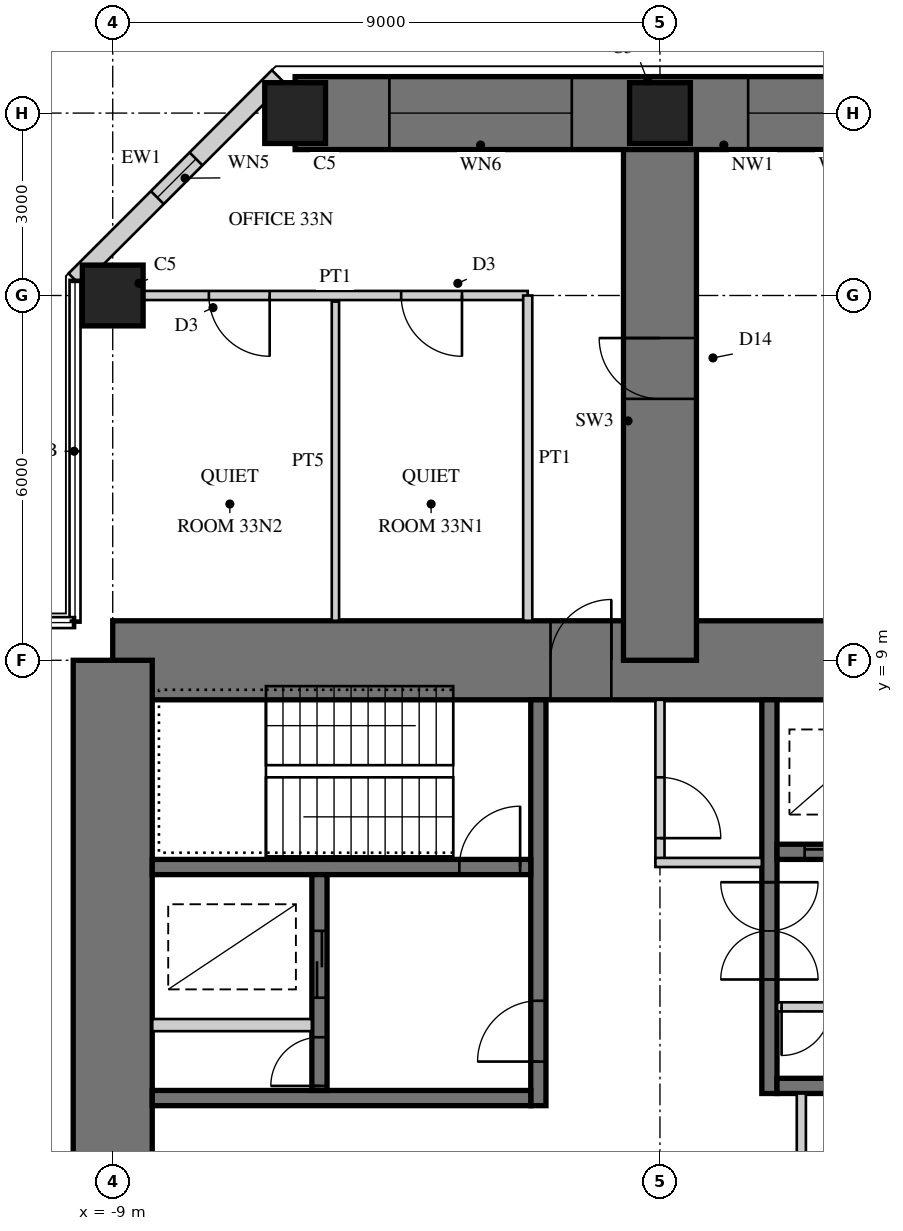
"""IFC4 building model, lengths in metres.
Left out: names, types, materials, properties, quantities, classifications, styles, units other than length and angle.
Written with IfcOpenShell. Run it as: python <this file> out.ifc"""

import sys

from ifc_helpers import new_model, si_unit, direction, frame, frame_2d, origin, origin_2d, place, context, subcontext, project, spatial, rectangle, hollow_rectangle, extrude, element, fill, save


model = new_model("IFC4")
c1 = context("Model", 3, precision=1e-05, world=origin(), true_north=direction((0.0, 1.0)))
c2 = subcontext(c1, "Body", "Model", "MODEL_VIEW")
j1 = project(units=[si_unit("LENGTHUNIT", "METRE"), si_unit("PLANEANGLEUNIT", "RADIAN")], contexts=[c1])
p1 = place(None, origin())
s1 = spatial("IfcSite", under=j1, at=p1, CompositionType="ELEMENT")
p2 = place(p1, origin())
s2 = spatial("IfcBuilding", under=s1, at=p2, CompositionType="ELEMENT")
p3 = place(p2, frame((0.0, 0.0, 136.5)))
s3 = spatial("IfcBuildingStorey", under=s2, at=p3, CompositionType="ELEMENT", Elevation=136.5)
p4 = place(p3, frame((9.0, 9.0, 0.0), z_axis=(0.0, 0.0, 1.0), x_axis=(-1.0, 0.0, 0.0)))
e1 = element("IfcWall", 1, at=p4, inside=s3, PredefinedType="SHEAR", context=c2, shape_type="SweptSolid", body=[
    extrude(rectangle(XDim=18.0, YDim=1.3, at=frame_2d((9.0, 0.0))), origin(), (0.0, 0.0, 1.0), 4.0),
])
p5 = place(p4, frame((9.8, 0.0, 0.0)))
e2 = element("IfcOpeningElement", 2, at=p5, cuts=e1, PredefinedType="OPENING", context=c2, shape_type="SweptSolid", body=[
    extrude(rectangle(XDim=1.0, YDim=2.4, at=frame_2d((0.5, 1.2))), frame((0.0, 0.66, 0.0), z_axis=(0.0, -1.0, 0.0), x_axis=(1.0, 0.0, 0.0)), (0.0, 0.0, 1.0), 1.32),
])
p6 = place(p3, frame((-9.0, 9.0, 0.0), z_axis=(0.0, 0.0, 1.0), x_axis=(0.0, -1.0, 0.0)))
e3 = element("IfcWall", 3, at=p6, inside=s3, PredefinedType="SHEAR", context=c2, shape_type="SweptSolid", body=[
    extrude(rectangle(XDim=18.0, YDim=1.3, at=frame_2d((9.0, 0.0))), origin(), (0.0, 0.0, 1.0), 4.0),
])
p7 = place(p6, frame((9.8, 0.0, 0.0)))
e4 = element("IfcOpeningElement", 4, at=p7, cuts=e3, PredefinedType="OPENING", context=c2, shape_type="SweptSolid", body=[
    extrude(rectangle(XDim=1.0, YDim=2.4, at=frame_2d((0.5, 1.2))), frame((0.0, 0.66, 0.0), z_axis=(0.0, -1.0, 0.0), x_axis=(1.0, 0.0, 0.0)), (0.0, 0.0, 1.0), 1.32),
])
p8 = place(p3, frame((1.8, 1.875, 0.0), z_axis=(0.0, 0.0, 1.0), x_axis=(0.0, 1.0, 0.0)))
e5 = element("IfcWall", 5, at=p8, inside=s3, PredefinedType="SHEAR", context=c2, shape_type="SweptSolid", body=[
    extrude(rectangle(XDim=6.475, YDim=0.25, at=frame_2d((3.238, 0.0))), origin(), (0.0, 0.0, 1.0), 4.0),
])
p9 = place(p8, frame((1.875, 0.0, 0.0)))
e6 = element("IfcOpeningElement", 6, at=p9, cuts=e5, PredefinedType="OPENING", context=c2, shape_type="SweptSolid", body=[
    extrude(rectangle(XDim=1.6, YDim=2.4, at=frame_2d((0.8, 1.2))), frame((0.0, 0.135, 0.0), z_axis=(0.0, -1.0, 0.0), x_axis=(1.0, 0.0, 0.0)), (0.0, 0.0, 1.0), 0.27),
])
p10 = place(p3, frame((1.925, 2.0, 0.0), z_axis=(0.0, 0.0, 1.0), x_axis=(1.0, 0.0, 0.0)))
e7 = element("IfcWall", 7, at=p10, inside=s3, PredefinedType="SHEAR", context=c2, shape_type="SweptSolid", body=[
    extrude(rectangle(XDim=6.425, YDim=0.25, at=frame_2d((3.212, 0.0))), origin(), (0.0, 0.0, 1.0), 4.0),
])
p11 = place(p3, frame((1.925, 5.85, 0.0), z_axis=(0.0, 0.0, 1.0), x_axis=(1.0, 0.0, 0.0)))
e8 = element("IfcWall", 8, at=p11, inside=s3, PredefinedType="SHEAR", context=c2, shape_type="SweptSolid", body=[
    extrude(rectangle(XDim=6.425, YDim=0.25, at=frame_2d((3.212, 0.0))), origin(), (0.0, 0.0, 1.0), 4.0),
])
p12 = place(p11, frame((0.454, 0.0, 0.0)))
e9 = element("IfcOpeningElement", 9, at=p12, cuts=e8, PredefinedType="OPENING", context=c2, shape_type="SweptSolid", body=[
    extrude(rectangle(XDim=1.1, YDim=2.2, at=frame_2d((0.55, 1.1))), frame((0.0, 0.135, 0.0), z_axis=(0.0, -1.0, 0.0), x_axis=(1.0, 0.0, 0.0)), (0.0, 0.0, 1.0), 0.27),
])
p13 = place(p11, frame((2.663, 0.0, 0.0)))
e10 = element("IfcOpeningElement", 10, at=p13, cuts=e8, PredefinedType="OPENING", context=c2, shape_type="SweptSolid", body=[
    extrude(rectangle(XDim=1.1, YDim=2.2, at=frame_2d((0.55, 1.1))), frame((0.0, 0.135, 0.0), z_axis=(0.0, -1.0, 0.0), x_axis=(1.0, 0.0, 0.0)), (0.0, 0.0, 1.0), 0.27),
])
p14 = place(p11, frame((4.871, 0.0, 0.0)))
e11 = element("IfcOpeningElement", 11, at=p14, cuts=e8, PredefinedType="OPENING", context=c2, shape_type="SweptSolid", body=[
    extrude(rectangle(XDim=1.1, YDim=2.2, at=frame_2d((0.55, 1.1))), frame((0.0, 0.135, 0.0), z_axis=(0.0, -1.0, 0.0), x_axis=(1.0, 0.0, 0.0)), (0.0, 0.0, 1.0), 0.27),
])
p15 = place(p3, frame((1.925, 3.3, 0.0), z_axis=(0.0, 0.0, 1.0), x_axis=(1.0, 0.0, 0.0)))
e12 = element("IfcWall", 12, at=p15, inside=s3, PredefinedType="PARTITIONING", context=c2, shape_type="SweptSolid", body=[
    extrude(rectangle(XDim=6.425, YDim=0.15, at=frame_2d((3.212, 0.0))), origin(), (0.0, 0.0, 1.0), 4.0),
])
p16 = place(p15, frame((0.075, 0.0, 0.0)))
e13 = element("IfcOpeningElement", 13, at=p16, cuts=e12, PredefinedType="OPENING", context=c2, shape_type="SweptSolid", body=[
    extrude(rectangle(XDim=0.8, YDim=2.1, at=frame_2d((0.4, 1.05))), frame((0.0, 0.085, 0.0), z_axis=(0.0, -1.0, 0.0), x_axis=(1.0, 0.0, 0.0)), (0.0, 0.0, 1.0), 0.17),
])
p17 = place(p15, frame((3.675, 0.0, 0.0)))
e14 = element("IfcOpeningElement", 14, at=p17, cuts=e12, PredefinedType="OPENING", context=c2, shape_type="SweptSolid", body=[
    extrude(rectangle(XDim=0.8, YDim=2.1, at=frame_2d((0.4, 1.05))), frame((0.0, 0.085, 0.0), z_axis=(0.0, -1.0, 0.0), x_axis=(1.0, 0.0, 0.0)), (0.0, 0.0, 1.0), 0.17),
])
p18 = place(p3, frame((-2.0, 1.675, 0.0), z_axis=(0.0, 0.0, 1.0), x_axis=(0.0, 1.0, 0.0)))
e15 = element("IfcWall", 15, at=p18, inside=s3, PredefinedType="SHEAR", context=c2, shape_type="SweptSolid", body=[
    extrude(rectangle(XDim=6.675, YDim=0.25, at=frame_2d((3.337, 0.0))), origin(), (0.0, 0.0, 1.0), 4.0),
])
p19 = place(p18, frame((0.725, 0.0, 0.0)))
e16 = element("IfcOpeningElement", 16, at=p19, cuts=e15, PredefinedType="OPENING", context=c2, shape_type="SweptSolid", body=[
    extrude(rectangle(XDim=1.0, YDim=2.1, at=frame_2d((0.5, 1.05))), frame((0.0, 0.135, 0.0), z_axis=(0.0, -1.0, 0.0), x_axis=(1.0, 0.0, 0.0)), (0.0, 0.0, 1.0), 0.27),
])
p20 = place(p3, frame((-2.125, 1.8, 0.0), z_axis=(0.0, 0.0, 1.0), x_axis=(-1.0, 0.0, 0.0)))
e17 = element("IfcWall", 17, at=p20, inside=s3, PredefinedType="SHEAR", context=c2, shape_type="SweptSolid", body=[
    extrude(rectangle(XDim=6.225, YDim=0.25, at=frame_2d((3.113, 0.0))), origin(), (0.0, 0.0, 1.0), 4.0),
])
p21 = place(p3, frame((-2.125, 5.6, 0.0), z_axis=(0.0, 0.0, 1.0), x_axis=(-1.0, 0.0, 0.0)))
e18 = element("IfcWall", 18, at=p21, inside=s3, PredefinedType="SHEAR", context=c2, shape_type="SweptSolid", body=[
    extrude(rectangle(XDim=6.225, YDim=0.25, at=frame_2d((3.113, 0.0))), origin(), (0.0, 0.0, 1.0), 4.0),
])
p22 = place(p21, frame((0.175, 0.0, 0.0)))
e19 = element("IfcOpeningElement", 19, at=p22, cuts=e18, PredefinedType="OPENING", context=c2, shape_type="SweptSolid", body=[
    extrude(rectangle(XDim=1.0, YDim=2.1, at=frame_2d((0.5, 1.05))), frame((0.0, 0.135, 0.0), z_axis=(0.0, -1.0, 0.0), x_axis=(1.0, 0.0, 0.0)), (0.0, 0.0, 1.0), 0.27),
])
p23 = place(p3, frame((-5.6, 1.925, 0.0), z_axis=(0.0, 0.0, 1.0), x_axis=(0.0, 1.0, 0.0)))
e20 = element("IfcWall", 20, at=p23, inside=s3, PredefinedType="SHEAR", context=c2, shape_type="SweptSolid", body=[
    extrude(rectangle(XDim=3.55, YDim=0.25, at=frame_2d((1.775, 0.0))), origin(), (0.0, 0.0, 1.0), 4.0),
])
p24 = place(p23, frame((1.525, 0.0, 0.0)))
e21 = element("IfcOpeningElement", 21, at=p24, cuts=e20, PredefinedType="OPENING", context=c2, shape_type="SweptSolid", body=[
    extrude(rectangle(XDim=1.1, YDim=2.2, at=frame_2d((0.55, 1.1))), frame((0.0, 0.135, 0.0), z_axis=(0.0, -1.0, 0.0), x_axis=(1.0, 0.0, 0.0)), (0.0, 0.0, 1.0), 0.27),
])
p25 = place(p23, frame((0.075, 0.0, 0.0)))
e22 = element("IfcOpeningElement", 22, at=p25, cuts=e20, PredefinedType="OPENING", context=c2, shape_type="SweptSolid", body=[
    extrude(rectangle(XDim=0.8, YDim=2.1, at=frame_2d((0.4, 1.05))), frame((0.0, 0.135, 0.0), z_axis=(0.0, -1.0, 0.0), x_axis=(1.0, 0.0, 0.0)), (0.0, 0.0, 1.0), 0.27),
])
p26 = place(p3, frame((-5.725, 3.0, 0.0), z_axis=(0.0, 0.0, 1.0), x_axis=(-1.0, 0.0, 0.0)))
e23 = element("IfcWall", 23, at=p26, inside=s3, PredefinedType="PARTITIONING", context=c2, shape_type="SweptSolid", body=[
    extrude(rectangle(XDim=2.625, YDim=0.2, at=frame_2d((1.312, 0.0))), origin(), (0.0, 0.0, 1.0), 4.0),
])
p27 = place(p3, frame((0.0, 9.0, 0.0), z_axis=(0.0, 0.0, 1.0), x_axis=(0.0, 1.0, 0.0)))
e24 = element("IfcWall", 24, at=p27, inside=s3, PredefinedType="SHEAR", context=c2, shape_type="SweptSolid", body=[
    extrude(rectangle(XDim=9.0, YDim=1.2, at=frame_2d((4.5, 0.0))), origin(), (0.0, 0.0, 1.0), 4.0),
])
p28 = place(p27, frame((4.3, 0.0, 0.0)))
e25 = element("IfcOpeningElement", 25, at=p28, cuts=e24, PredefinedType="OPENING", context=c2, shape_type="SweptSolid", body=[
    extrude(rectangle(XDim=1.0, YDim=2.2, at=frame_2d((0.5, 1.1))), frame((0.0, 0.61, 0.0), z_axis=(0.0, -1.0, 0.0), x_axis=(1.0, 0.0, 0.0)), (0.0, 0.0, 1.0), 1.22),
])
p29 = place(p3, frame((6.0, 18.0, 0.0), z_axis=(0.0, 0.0, 1.0), x_axis=(-1.0, 0.0, 0.0)))
e26 = element("IfcWall", 26, at=p29, inside=s3, PredefinedType="SHEAR", context=c2, shape_type="SweptSolid", body=[
    extrude(rectangle(XDim=12.0, YDim=1.2, at=frame_2d((6.0, 0.0))), origin(), (0.0, 0.0, 1.0), 4.0),
])
p30 = place(p29, frame((1.55, 0.0, 0.6)))
e27 = element("IfcOpeningElement", 27, at=p30, cuts=e26, PredefinedType="OPENING", context=c2, shape_type="SweptSolid", body=[
    extrude(rectangle(XDim=3.0, YDim=2.4, at=frame_2d((1.5, 1.2))), frame((0.0, 0.61, 0.0), z_axis=(0.0, -1.0, 0.0), x_axis=(1.0, 0.0, 0.0)), (0.0, 0.0, 1.0), 1.22),
])
p31 = place(p29, frame((7.45, 0.0, 0.6)))
e28 = element("IfcOpeningElement", 28, at=p31, cuts=e26, PredefinedType="OPENING", context=c2, shape_type="SweptSolid", body=[
    extrude(rectangle(XDim=3.0, YDim=2.4, at=frame_2d((1.5, 1.2))), frame((0.0, 0.61, 0.0), z_axis=(0.0, -1.0, 0.0), x_axis=(1.0, 0.0, 0.0)), (0.0, 0.0, 1.0), 1.22),
])
for number, where, z_axis, x_axis in (
    (29, (-9.0, 15.0, 0.0), (0.0, 0.0, 1.0), (1.0, 0.0, 0.0)),
    (30, (0.0, 18.0, 0.0), (0.0, 0.0, 1.0), (1.0, 0.0, 0.0)),
    (31, (-6.0, 18.0, 0.0), (0.0, 0.0, 1.0), (1.0, 0.0, 0.0)),
):
    element("IfcColumn", number, at=place(p3, frame(where, z_axis=z_axis, x_axis=x_axis)), inside=s3, PredefinedType="COLUMN", context=c2, shape_type="SweptSolid", body=[
        extrude(rectangle(XDim=1.0, YDim=1.0, at=origin_2d()), origin(), (0.0, 0.0, 1.0), 4.0),
    ])
p32 = place(p3, frame((-6.277, 18.6, 0.0), z_axis=(0.0, 0.0, 1.0), x_axis=(-0.707106781187, -0.707106781187, 0.0)))
e32 = element("IfcWall", 32, at=p32, inside=s3, PredefinedType="SOLIDWALL", context=c2, shape_type="SweptSolid", body=[
    extrude(rectangle(XDim=4.728, YDim=0.3, at=frame_2d((2.364, 0.0))), origin(), (0.0, 0.0, 1.0), 3.8),
])
p33 = place(p32, frame((1.914, 0.0, 0.3)))
e33 = element("IfcOpeningElement", 33, at=p33, cuts=e32, PredefinedType="OPENING", context=c2, shape_type="SweptSolid", body=[
    extrude(rectangle(XDim=0.9, YDim=2.4, at=frame_2d((0.45, 1.2))), frame((0.0, 0.16, 0.0), z_axis=(0.0, -1.0, 0.0), x_axis=(1.0, 0.0, 0.0)), (0.0, 0.0, 1.0), 0.32),
])
p34 = place(p3, frame((2.325, 1.875, 0.0), z_axis=(0.0, 0.0, 1.0), x_axis=(0.0, -1.0, 0.0)))
e34 = element("IfcWall", 34, at=p34, inside=s3, PredefinedType="PARTITIONING", context=c2, shape_type="SweptSolid", body=[
    extrude(rectangle(XDim=1.95, YDim=0.15, at=frame_2d((0.975, 0.0))), origin(), (0.0, 0.0, 1.0), 3.8),
])
p35 = place(p3, frame((0.0, 5.675, 0.0), z_axis=(0.0, 0.0, 1.0), x_axis=(0.0, 1.0, 0.0)))
e35 = element("IfcWall", 35, at=p35, inside=s3, PredefinedType="PARTITIONING", context=c2, shape_type="SweptSolid", body=[
    extrude(rectangle(XDim=2.675, YDim=0.15, at=frame_2d((1.337, 0.0))), origin(), (0.0, 0.0, 1.0), 3.8),
])
p36 = place(p35, frame((0.4, 0.0, 0.0)))
e36 = element("IfcOpeningElement", 36, at=p36, cuts=e35, PredefinedType="OPENING", context=c2, shape_type="SweptSolid", body=[
    extrude(rectangle(XDim=1.0, YDim=2.1, at=frame_2d((0.5, 1.05))), frame((0.0, 0.085, 0.0), z_axis=(0.0, -1.0, 0.0), x_axis=(1.0, 0.0, 0.0)), (0.0, 0.0, 1.0), 0.17),
])
p37 = place(p3, frame((1.675, 5.675, 0.0), z_axis=(0.0, 0.0, 1.0), x_axis=(-1.0, 0.0, 0.0)))
e37 = element("IfcWall", 37, at=p37, inside=s3, PredefinedType="PARTITIONING", context=c2, shape_type="SweptSolid", body=[
    extrude(rectangle(XDim=1.75, YDim=0.15, at=frame_2d((0.875, 0.0))), origin(), (0.0, 0.0, 1.0), 3.8),
])
p38 = place(p3, frame((-2.175, 15.0, 0.0), z_axis=(0.0, 0.0, 1.0), x_axis=(-1.0, 0.0, 0.0)))
e38 = element("IfcWall", 38, at=p38, inside=s3, PredefinedType="PARTITIONING", context=c2, shape_type="SweptSolid", body=[
    extrude(rectangle(XDim=6.325, YDim=0.15, at=frame_2d((3.163, 0.0))), origin(), (0.0, 0.0, 1.0), 3.0),
])
p39 = place(p38, frame((1.081, 0.0, 0.0)))
e39 = element("IfcOpeningElement", 39, at=p39, cuts=e38, PredefinedType="OPENING", context=c2, shape_type="SweptSolid", body=[
    extrude(rectangle(XDim=1.0, YDim=2.1, at=frame_2d((0.5, 1.05))), frame((0.0, 0.085, 0.0), z_axis=(0.0, -1.0, 0.0), x_axis=(1.0, 0.0, 0.0)), (0.0, 0.0, 1.0), 0.17),
])
p40 = place(p38, frame((4.244, 0.0, 0.0)))
e40 = element("IfcOpeningElement", 40, at=p40, cuts=e38, PredefinedType="OPENING", context=c2, shape_type="SweptSolid", body=[
    extrude(rectangle(XDim=1.0, YDim=2.1, at=frame_2d((0.5, 1.05))), frame((0.0, 0.085, 0.0), z_axis=(0.0, -1.0, 0.0), x_axis=(1.0, 0.0, 0.0)), (0.0, 0.0, 1.0), 0.17),
])
p41 = place(p3, frame((-2.175, 9.65, 0.0), z_axis=(0.0, 0.0, 1.0), x_axis=(0.0, 1.0, 0.0)))
e41 = element("IfcWall", 41, at=p41, inside=s3, PredefinedType="PARTITIONING", context=c2, shape_type="SweptSolid", body=[
    extrude(rectangle(XDim=5.35, YDim=0.15, at=frame_2d((2.675, 0.0))), origin(), (0.0, 0.0, 1.0), 3.8),
])
p42 = place(p3, frame((-5.337, 9.65, 0.0), z_axis=(0.0, 0.0, 1.0), x_axis=(0.0, 1.0, 0.0)))
e42 = element("IfcWall", 42, at=p42, inside=s3, PredefinedType="PLUMBINGWALL", context=c2, shape_type="SweptSolid", body=[
    extrude(rectangle(XDim=5.25, YDim=0.12, at=frame_2d((2.625, 0.0))), origin(), (0.0, 0.0, 1.0), 3.8),
])
p43 = place(p30, origin())
e43 = element("IfcWindow", 43, at=p43, inside=s3, PartitioningType="SINGLE_PANEL", PredefinedType="WINDOW", context=c2, shape_type="SweptSolid", body=[
    extrude(hollow_rectangle(XDim=3.0, YDim=2.4, WallThickness=0.06, at=frame_2d((1.5, 1.2))), frame((0.0, 0.03, 0.0), z_axis=(0.0, -1.0, 0.0), x_axis=(1.0, 0.0, 0.0)), (0.0, 0.0, 1.0), 0.06),
    extrude(rectangle(XDim=2.879, YDim=2.279, at=frame_2d((1.5, 1.2))), frame((0.0, 0.03, 0.0), z_axis=(0.0, -1.0, 0.0), x_axis=(1.0, 0.0, 0.0)), (0.0, 0.0, 1.0), 0.06),
])
fill(e27, e43)
p44 = place(p31, origin())
e44 = element("IfcWindow", 44, at=p44, inside=s3, PartitioningType="SINGLE_PANEL", PredefinedType="WINDOW", context=c2, shape_type="SweptSolid", body=[
    extrude(hollow_rectangle(XDim=3.0, YDim=2.4, WallThickness=0.06, at=frame_2d((1.5, 1.2))), frame((0.0, 0.03, 0.0), z_axis=(0.0, -1.0, 0.0), x_axis=(1.0, 0.0, 0.0)), (0.0, 0.0, 1.0), 0.06),
    extrude(rectangle(XDim=2.879, YDim=2.279, at=frame_2d((1.5, 1.2))), frame((0.0, 0.03, 0.0), z_axis=(0.0, -1.0, 0.0), x_axis=(1.0, 0.0, 0.0)), (0.0, 0.0, 1.0), 0.06),
])
fill(e28, e44)
p45 = place(p33, origin())
e45 = element("IfcWindow", 45, at=p45, inside=s3, PartitioningType="SINGLE_PANEL", PredefinedType="WINDOW", context=c2, shape_type="SweptSolid", body=[
    extrude(hollow_rectangle(XDim=0.9, YDim=2.4, WallThickness=0.06, at=frame_2d((0.45, 1.2))), frame((0.0, 0.03, 0.0), z_axis=(0.0, -1.0, 0.0), x_axis=(1.0, 0.0, 0.0)), (0.0, 0.0, 1.0), 0.06),
    extrude(rectangle(XDim=0.779, YDim=2.279, at=frame_2d((0.45, 1.2))), frame((0.0, 0.03, 0.0), z_axis=(0.0, -1.0, 0.0), x_axis=(1.0, 0.0, 0.0)), (0.0, 0.0, 1.0), 0.06),
])
fill(e33, e45)
p46 = place(p36, frame((1.0, 0.0, 0.0), z_axis=(0.0, 0.0, 1.0), x_axis=(-1.0, 0.0, 0.0)))
e46 = element("IfcDoor", 46, at=p46, inside=s3, OperationType="SINGLE_SWING_RIGHT", PredefinedType="DOOR", context=c2, shape_type="SweptSolid", body=[
    extrude(rectangle(XDim=1.0, YDim=2.1, at=frame_2d((0.5, 1.05))), frame((0.0, 0.025, 0.0), z_axis=(0.0, -1.0, 0.0), x_axis=(1.0, 0.0, 0.0)), (0.0, 0.0, 1.0), 0.05),
])
fill(e36, e46)
p47 = place(p39, origin())
e47 = element("IfcDoor", 47, at=p47, inside=s3, OperationType="SINGLE_SWING_LEFT", PredefinedType="DOOR", context=c2, shape_type="SweptSolid", body=[
    extrude(rectangle(XDim=1.0, YDim=2.1, at=frame_2d((0.5, 1.05))), frame((0.0, 0.025, 0.0), z_axis=(0.0, -1.0, 0.0), x_axis=(1.0, 0.0, 0.0)), (0.0, 0.0, 1.0), 0.05),
])
fill(e39, e47)
p48 = place(p40, origin())
e48 = element("IfcDoor", 48, at=p48, inside=s3, OperationType="SINGLE_SWING_LEFT", PredefinedType="DOOR", context=c2, shape_type="SweptSolid", body=[
    extrude(rectangle(XDim=1.0, YDim=2.1, at=frame_2d((0.5, 1.05))), frame((0.0, 0.025, 0.0), z_axis=(0.0, -1.0, 0.0), x_axis=(1.0, 0.0, 0.0)), (0.0, 0.0, 1.0), 0.05),
])
fill(e40, e48)
p49 = place(p28, origin())
e49 = element("IfcDoor", 49, at=p49, inside=s3, OperationType="SINGLE_SWING_RIGHT", PredefinedType="DOOR", context=c2, shape_type="SweptSolid", body=[
    extrude(rectangle(XDim=1.0, YDim=2.2, at=frame_2d((0.5, 1.1))), frame((0.0, 0.025, 0.0), z_axis=(0.0, -1.0, 0.0), x_axis=(1.0, 0.0, 0.0)), (0.0, 0.0, 1.0), 0.05),
])
fill(e25, e49)
p50 = place(p5, frame((1.0, 0.0, 0.0), z_axis=(0.0, 0.0, 1.0), x_axis=(-1.0, 0.0, 0.0)))
e50 = element("IfcDoor", 50, at=p50, inside=s3, OperationType="SINGLE_SWING_RIGHT", PredefinedType="DOOR", context=c2, shape_type="SweptSolid", body=[
    extrude(rectangle(XDim=1.0, YDim=2.4, at=frame_2d((0.5, 1.2))), frame((0.0, -0.005, 0.0), z_axis=(0.0, -1.0, 0.0), x_axis=(1.0, 0.0, 0.0)), (0.0, 0.0, 1.0), 0.05),
])
fill(e2, e50)
p51 = place(p12, origin())
e51 = element("IfcDoor", 51, at=p51, inside=s3, OperationType="DOUBLE_DOOR_SLIDING", PredefinedType="DOOR", context=c2, shape_type="SweptSolid", body=[
    extrude(rectangle(XDim=1.1, YDim=2.2, at=frame_2d((0.55, 1.1))), frame((0.0, 0.025, 0.0), z_axis=(0.0, -1.0, 0.0), x_axis=(1.0, 0.0, 0.0)), (0.0, 0.0, 1.0), 0.05),
])
fill(e9, e51)
p52 = place(p9, origin())
e52 = element("IfcDoor", 52, at=p52, inside=s3, OperationType="DOUBLE_DOOR_DOUBLE_SWING", PredefinedType="DOOR", context=c2, shape_type="SweptSolid", body=[
    extrude(rectangle(XDim=1.6, YDim=2.4, at=frame_2d((0.8, 1.2))), frame((0.0, 0.025, 0.0), z_axis=(0.0, -1.0, 0.0), x_axis=(1.0, 0.0, 0.0)), (0.0, 0.0, 1.0), 0.05),
])
fill(e6, e52)
p53 = place(p16, frame((0.8, 0.0, 0.0), z_axis=(0.0, 0.0, 1.0), x_axis=(-1.0, 0.0, 0.0)))
e53 = element("IfcDoor", 53, at=p53, inside=s3, OperationType="SINGLE_SWING_RIGHT", PredefinedType="DOOR", context=c2, shape_type="SweptSolid", body=[
    extrude(rectangle(XDim=0.8, YDim=2.1, at=frame_2d((0.4, 1.05))), frame((0.0, 0.025, 0.0), z_axis=(0.0, -1.0, 0.0), x_axis=(1.0, 0.0, 0.0)), (0.0, 0.0, 1.0), 0.05),
])
fill(e13, e53)
p54 = place(p19, origin())
e54 = element("IfcDoor", 54, at=p54, inside=s3, OperationType="SINGLE_SWING_LEFT", PredefinedType="DOOR", context=c2, shape_type="SweptSolid", body=[
    extrude(rectangle(XDim=1.0, YDim=2.1, at=frame_2d((0.5, 1.05))), frame((0.0, 0.025, 0.0), z_axis=(0.0, -1.0, 0.0), x_axis=(1.0, 0.0, 0.0)), (0.0, 0.0, 1.0), 0.05),
])
fill(e16, e54)
p55 = place(p22, frame((1.0, 0.0, 0.0), z_axis=(0.0, 0.0, 1.0), x_axis=(-1.0, 0.0, 0.0)))
e55 = element("IfcDoor", 55, at=p55, inside=s3, OperationType="SINGLE_SWING_RIGHT", PredefinedType="DOOR", context=c2, shape_type="SweptSolid", body=[
    extrude(rectangle(XDim=1.0, YDim=2.1, at=frame_2d((0.5, 1.05))), frame((0.0, 0.025, 0.0), z_axis=(0.0, -1.0, 0.0), x_axis=(1.0, 0.0, 0.0)), (0.0, 0.0, 1.0), 0.05),
])
fill(e19, e55)
p56 = place(p24, origin())
e56 = element("IfcDoor", 56, at=p56, inside=s3, OperationType="DOUBLE_DOOR_SLIDING", PredefinedType="DOOR", context=c2, shape_type="SweptSolid", body=[
    extrude(rectangle(XDim=1.1, YDim=2.2, at=frame_2d((0.55, 1.1))), frame((0.0, 0.025, 0.0), z_axis=(0.0, -1.0, 0.0), x_axis=(1.0, 0.0, 0.0)), (0.0, 0.0, 1.0), 0.05),
])
fill(e21, e56)
p57 = place(p25, origin())
e57 = element("IfcDoor", 57, at=p57, inside=s3, OperationType="SINGLE_SWING_LEFT", PredefinedType="DOOR", context=c2, shape_type="SweptSolid", body=[
    extrude(rectangle(XDim=0.8, YDim=2.1, at=frame_2d((0.4, 1.05))), frame((0.0, 0.025, 0.0), z_axis=(0.0, -1.0, 0.0), x_axis=(1.0, 0.0, 0.0)), (0.0, 0.0, 1.0), 0.05),
])
fill(e22, e57)
save(model, sys.argv[1])
